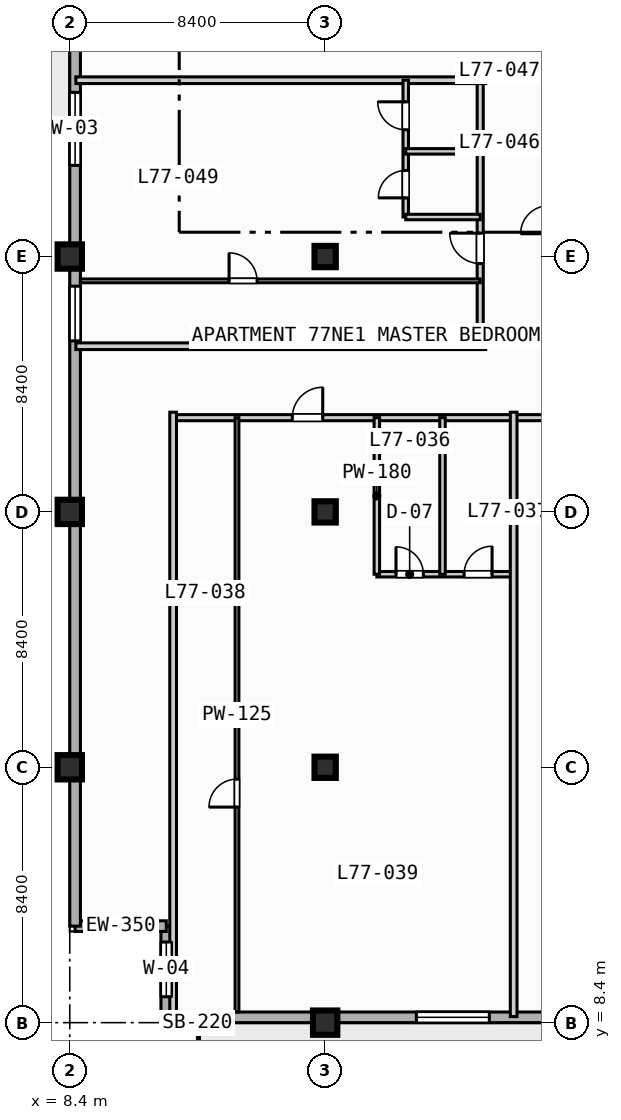
"""IFC4 building model, lengths in metres.
Left out: names, types, materials, properties, quantities, classifications, styles, units other than length and angle.
Written with IfcOpenShell. Run it as: python <this file> out.ifc"""

import sys

from ifc_helpers import new_model, si_unit, direction, frame, frame_2d, origin, origin_2d, place, context, subcontext, project, spatial, rectangle, extrude, element, fill, save


model = new_model("IFC4")
c1 = context("Model", 3, precision=1e-05, world=origin(), true_north=direction((0.0, 1.0)))
c2 = subcontext(c1, "Body", "Model", "MODEL_VIEW")
j1 = project(units=[si_unit("LENGTHUNIT", "METRE"), si_unit("PLANEANGLEUNIT", "RADIAN")], contexts=[c1])
p1 = place(None, origin())
s1 = spatial("IfcSite", under=j1, at=p1, CompositionType="ELEMENT")
p2 = place(p1, origin())
s2 = spatial("IfcBuilding", under=s1, at=p2, CompositionType="ELEMENT")
p3 = place(p2, frame((0.0, 0.0, 312.5)))
s3 = spatial("IfcBuildingStorey", under=s2, at=p3, CompositionType="ELEMENT", Elevation=312.5)
for number, where, z_axis, x_axis in (
    (1, (8.4, 16.8, 0.0), (0.0, 0.0, 1.0), (1.0, 0.0, 0.0)),
    (2, (8.4, 25.2, 0.0), (0.0, 0.0, 1.0), (1.0, 0.0, 0.0)),
    (3, (8.4, 33.6, 0.0), (0.0, 0.0, 1.0), (1.0, 0.0, 0.0)),
    (4, (16.8, 8.4, 0.0), (0.0, 0.0, 1.0), (1.0, 0.0, 0.0)),
):
    element("IfcColumn", number, at=place(p3, frame(where, z_axis=z_axis, x_axis=x_axis)), inside=s3, PredefinedType="COLUMN", context=c2, shape_type="SweptSolid", body=[
        extrude(rectangle(XDim=0.8, YDim=0.8, at=origin_2d()), origin(), (0.0, 0.0, 1.0), 3.9),
    ])
for number, where, z_axis, x_axis in (
    (5, (16.8, 16.8, 0.0), (0.0, 0.0, 1.0), (1.0, 0.0, 0.0)),
    (6, (16.8, 25.2, 0.0), (0.0, 0.0, 1.0), (1.0, 0.0, 0.0)),
    (7, (16.8, 33.6, 0.0), (0.0, 0.0, 1.0), (1.0, 0.0, 0.0)),
):
    element("IfcColumn", number, at=place(p3, frame(where, z_axis=z_axis, x_axis=x_axis)), inside=s3, PredefinedType="COLUMN", context=c2, shape_type="SweptSolid", body=[
        extrude(rectangle(XDim=0.7, YDim=0.7, at=origin_2d()), origin(), (0.0, 0.0, 1.0), 3.9),
    ])
p4 = place(p3, frame((11.575, 8.575, 0.0), z_axis=(0.0, 0.0, 1.0), x_axis=(0.0, 1.0, 0.0)))
e8 = element("IfcWall", 8, at=p4, inside=s3, PredefinedType="STANDARD", context=c2, shape_type="SweptSolid", body=[
    extrude(rectangle(XDim=3.0, YDim=0.35, at=frame_2d((1.5, 0.0))), origin(), (0.0, 0.0, 1.0), 3.67),
])
p5 = place(p4, frame((0.677, 0.0, 0.85)))
e9 = element("IfcOpeningElement", 9, at=p5, cuts=e8, PredefinedType="OPENING", context=c2, shape_type="SweptSolid", body=[
    extrude(rectangle(XDim=1.8, YDim=1.8, at=frame_2d((0.9, 0.9))), frame((0.0, 0.185, 0.0), z_axis=(0.0, -1.0, 0.0), x_axis=(1.0, 0.0, 0.0)), (0.0, 0.0, 1.0), 0.37),
])
p6 = place(p3, frame((11.575, 11.575, 0.0), z_axis=(0.0, 0.0, 1.0), x_axis=(-1.0, 0.0, 0.0)))
e10 = element("IfcWall", 10, at=p6, inside=s3, PredefinedType="STANDARD", context=c2, shape_type="SweptSolid", body=[
    extrude(rectangle(XDim=3.0, YDim=0.35, at=frame_2d((1.5, 0.0))), origin(), (0.0, 0.0, 1.0), 3.67),
])
p7 = place(p3, frame((8.575, 11.575, 0.0), z_axis=(0.0, 0.0, 1.0), x_axis=(0.0, 1.0, 0.0)))
e11 = element("IfcWall", 11, at=p7, inside=s3, PredefinedType="STANDARD", context=c2, shape_type="SweptSolid", body=[
    extrude(rectangle(XDim=60.85, YDim=0.35, at=frame_2d((30.425, 0.0))), origin(), (0.0, 0.0, 1.0), 3.67),
])
p8 = place(p7, frame((33.925, 0.0, 0.0)))
e12 = element("IfcOpeningElement", 12, at=p8, cuts=e11, PredefinedType="OPENING", context=c2, shape_type="SweptSolid", body=[
    extrude(rectangle(XDim=1.4, YDim=2.2, at=frame_2d((0.7, 1.1))), frame((0.0, 0.185, 0.0), z_axis=(0.0, -1.0, 0.0), x_axis=(1.0, 0.0, 0.0)), (0.0, 0.0, 1.0), 0.37),
])
p9 = place(p7, frame((25.025, 0.0, 0.85)))
e13 = element("IfcOpeningElement", 13, at=p9, cuts=e11, PredefinedType="OPENING", context=c2, shape_type="SweptSolid", body=[
    extrude(rectangle(XDim=2.4, YDim=1.95, at=frame_2d((1.2, 0.975))), frame((0.0, 0.185, 0.0), z_axis=(0.0, -1.0, 0.0), x_axis=(1.0, 0.0, 0.0)), (0.0, 0.0, 1.0), 0.37),
])
p10 = place(p7, frame((41.825, 0.0, 0.85)))
e14 = element("IfcOpeningElement", 14, at=p10, cuts=e11, PredefinedType="OPENING", context=c2, shape_type="SweptSolid", body=[
    extrude(rectangle(XDim=2.4, YDim=1.95, at=frame_2d((1.2, 0.975))), frame((0.0, 0.185, 0.0), z_axis=(0.0, -1.0, 0.0), x_axis=(1.0, 0.0, 0.0)), (0.0, 0.0, 1.0), 0.37),
])
p11 = place(p7, frame((19.25, 0.0, 0.85)))
e15 = element("IfcOpeningElement", 15, at=p11, cuts=e11, PredefinedType="OPENING", context=c2, shape_type="SweptSolid", body=[
    extrude(rectangle(XDim=1.8, YDim=1.8, at=frame_2d((0.9, 0.9))), frame((0.0, 0.185, 0.0), z_axis=(0.0, -1.0, 0.0), x_axis=(1.0, 0.0, 0.0)), (0.0, 0.0, 1.0), 0.37),
])
p12 = place(p3, frame((64.025, 8.575, 0.0), z_axis=(0.0, 0.0, 1.0), x_axis=(-1.0, 0.0, 0.0)))
e16 = element("IfcWall", 16, at=p12, inside=s3, PredefinedType="STANDARD", context=c2, shape_type="SweptSolid", body=[
    extrude(rectangle(XDim=52.45, YDim=0.35, at=frame_2d((26.225, 0.0))), origin(), (0.0, 0.0, 1.0), 3.67),
])
p13 = place(p12, frame((33.925, 0.0, 0.0)))
e17 = element("IfcOpeningElement", 17, at=p13, cuts=e16, PredefinedType="OPENING", context=c2, shape_type="SweptSolid", body=[
    extrude(rectangle(XDim=1.4, YDim=2.2, at=frame_2d((0.7, 1.1))), frame((0.0, 0.185, 0.0), z_axis=(0.0, -1.0, 0.0), x_axis=(1.0, 0.0, 0.0)), (0.0, 0.0, 1.0), 0.37),
])
p14 = place(p12, frame((41.825, 0.0, 0.85)))
e18 = element("IfcOpeningElement", 18, at=p14, cuts=e16, PredefinedType="OPENING", context=c2, shape_type="SweptSolid", body=[
    extrude(rectangle(XDim=2.4, YDim=1.95, at=frame_2d((1.2, 0.975))), frame((0.0, 0.185, 0.0), z_axis=(0.0, -1.0, 0.0), x_axis=(1.0, 0.0, 0.0)), (0.0, 0.0, 1.0), 0.37),
])
p15 = place(p12, frame((25.025, 0.0, 0.85)))
e19 = element("IfcOpeningElement", 19, at=p15, cuts=e16, PredefinedType="OPENING", context=c2, shape_type="SweptSolid", body=[
    extrude(rectangle(XDim=2.4, YDim=1.95, at=frame_2d((1.2, 0.975))), frame((0.0, 0.185, 0.0), z_axis=(0.0, -1.0, 0.0), x_axis=(1.0, 0.0, 0.0)), (0.0, 0.0, 1.0), 0.37),
])
p16 = place(p12, frame((16.925, 0.0, 0.85)))
e20 = element("IfcOpeningElement", 20, at=p16, cuts=e16, PredefinedType="OPENING", context=c2, shape_type="SweptSolid", body=[
    extrude(rectangle(XDim=1.8, YDim=1.8, at=frame_2d((0.9, 0.9))), frame((0.0, 0.185, 0.0), z_axis=(0.0, -1.0, 0.0), x_axis=(1.0, 0.0, 0.0)), (0.0, 0.0, 1.0), 0.37),
])
p17 = place(p12, frame((50.275, 0.0, 0.85)))
e21 = element("IfcOpeningElement", 21, at=p17, cuts=e16, PredefinedType="OPENING", context=c2, shape_type="SweptSolid", body=[
    extrude(rectangle(XDim=1.8, YDim=1.8, at=frame_2d((0.9, 0.9))), frame((0.0, 0.185, 0.0), z_axis=(0.0, -1.0, 0.0), x_axis=(1.0, 0.0, 0.0)), (0.0, 0.0, 1.0), 0.37),
])
p18 = place(p3, frame((11.8, 28.3, 0.0), z_axis=(0.0, 0.0, 1.0), x_axis=(1.0, 0.0, 0.0)))
e22 = element("IfcWall", 22, at=p18, inside=s3, PredefinedType="PARTITIONING", context=c2, shape_type="SweptSolid", body=[
    extrude(rectangle(XDim=27.6, YDim=0.2, at=frame_2d((13.8, 0.0))), origin(), (0.0, 0.0, 1.0), 3.67),
])
p19 = place(p18, frame((3.92, 0.0, 0.0)))
e23 = element("IfcOpeningElement", 23, at=p19, cuts=e22, PredefinedType="OPENING", context=c2, shape_type="SweptSolid", body=[
    extrude(rectangle(XDim=1.0, YDim=2.15, at=frame_2d((0.5, 1.075))), frame((0.0, 0.11, 0.0), z_axis=(0.0, -1.0, 0.0), x_axis=(1.0, 0.0, 0.0)), (0.0, 0.0, 1.0), 0.22),
])
p20 = place(p18, frame((12.57, 0.0, 0.0)))
e24 = element("IfcOpeningElement", 24, at=p20, cuts=e22, PredefinedType="OPENING", context=c2, shape_type="SweptSolid", body=[
    extrude(rectangle(XDim=1.0, YDim=2.15, at=frame_2d((0.5, 1.075))), frame((0.0, 0.11, 0.0), z_axis=(0.0, -1.0, 0.0), x_axis=(1.0, 0.0, 0.0)), (0.0, 0.0, 1.0), 0.22),
])
p21 = place(p18, frame((20.77, 0.0, 0.0)))
e25 = element("IfcOpeningElement", 25, at=p21, cuts=e22, PredefinedType="OPENING", context=c2, shape_type="SweptSolid", body=[
    extrude(rectangle(XDim=1.0, YDim=2.15, at=frame_2d((0.5, 1.075))), frame((0.0, 0.11, 0.0), z_axis=(0.0, -1.0, 0.0), x_axis=(1.0, 0.0, 0.0)), (0.0, 0.0, 1.0), 0.22),
])
p22 = place(p3, frame((11.8, 8.6, 0.0), z_axis=(0.0, 0.0, 1.0), x_axis=(0.0, 1.0, 0.0)))
e26 = element("IfcWall", 26, at=p22, inside=s3, PredefinedType="PARTITIONING", context=c2, shape_type="SweptSolid", body=[
    extrude(rectangle(XDim=19.88, YDim=0.22, at=frame_2d((9.94, 0.0))), origin(), (0.0, 0.0, 1.0), 3.67),
])
p23 = place(p3, frame((18.5, 23.15, 0.0), z_axis=(0.0, 0.0, 1.0), x_axis=(1.0, 0.0, 0.0)))
e27 = element("IfcWall", 27, at=p23, inside=s3, PredefinedType="PLUMBINGWALL", context=c2, shape_type="SweptSolid", body=[
    extrude(rectangle(XDim=4.5, YDim=0.18, at=frame_2d((2.25, 0.0))), origin(), (0.0, 0.0, 1.0), 3.67),
])
p24 = place(p23, frame((0.63, 0.0, 0.0)))
e28 = element("IfcOpeningElement", 28, at=p24, cuts=e27, PredefinedType="OPENING", context=c2, shape_type="SweptSolid", body=[
    extrude(rectangle(XDim=0.9, YDim=2.1, at=frame_2d((0.45, 1.05))), frame((0.0, 0.1, 0.0), z_axis=(0.0, -1.0, 0.0), x_axis=(1.0, 0.0, 0.0)), (0.0, 0.0, 1.0), 0.2),
])
p25 = place(p23, frame((2.87, 0.0, 0.0)))
e29 = element("IfcOpeningElement", 29, at=p25, cuts=e27, PredefinedType="OPENING", context=c2, shape_type="SweptSolid", body=[
    extrude(rectangle(XDim=0.92, YDim=2.1, at=frame_2d((0.46, 1.05))), frame((0.0, 0.1, 0.0), z_axis=(0.0, -1.0, 0.0), x_axis=(1.0, 0.0, 0.0)), (0.0, 0.0, 1.0), 0.2),
])
for number, where, z_axis, x_axis in (
    (30, (18.5, 23.15, 0.0), (0.0, 0.0, 1.0), (0.0, 1.0, 0.0)),
    (31, (20.66, 23.15, 0.0), (0.0, 0.0, 1.0), (0.0, 1.0, 0.0)),
):
    element("IfcWall", number, at=place(p3, frame(where, z_axis=z_axis, x_axis=x_axis)), inside=s3, PredefinedType="PLUMBINGWALL", context=c2, shape_type="SweptSolid", body=[
        extrude(rectangle(XDim=5.15, YDim=0.18, at=frame_2d((2.575, 0.0))), origin(), (0.0, 0.0, 1.0), 3.67),
    ])
p26 = place(p3, frame((13.9, 8.75, 0.0), z_axis=(0.0, 0.0, 1.0), x_axis=(0.0, 1.0, 0.0)))
e32 = element("IfcWall", 32, at=p26, inside=s3, PredefinedType="PARTITIONING", context=c2, shape_type="SweptSolid", body=[
    extrude(rectangle(XDim=19.55, YDim=0.125, at=frame_2d((9.775, 0.0))), origin(), (0.0, 0.0, 1.0), 3.67),
])
p27 = place(p26, frame((6.74, 0.0, 0.0)))
e33 = element("IfcOpeningElement", 33, at=p27, cuts=e32, PredefinedType="OPENING", context=c2, shape_type="SweptSolid", body=[
    extrude(rectangle(XDim=0.92, YDim=2.1, at=frame_2d((0.46, 1.05))), frame((0.0, 0.073, 0.0), z_axis=(0.0, -1.0, 0.0), x_axis=(1.0, 0.0, 0.0)), (0.0, 0.0, 1.0), 0.145),
])
p28 = place(p3, frame((23.0, 8.6, 0.0), z_axis=(0.0, 0.0, 1.0), x_axis=(0.0, 1.0, 0.0)))
e34 = element("IfcWall", 34, at=p28, inside=s3, PredefinedType="PARTITIONING", context=c2, shape_type="SweptSolid", body=[
    extrude(rectangle(XDim=19.88, YDim=0.22, at=frame_2d((9.94, 0.0))), origin(), (0.0, 0.0, 1.0), 3.67),
])
p29 = place(p3, frame((21.9, 30.65, 0.0), z_axis=(0.0, 0.0, 1.0), x_axis=(0.0, 1.0, 0.0)))
e35 = element("IfcWall", 35, at=p29, inside=s3, PredefinedType="PARTITIONING", context=c2, shape_type="SweptSolid", body=[
    extrude(rectangle(XDim=8.75, YDim=0.2, at=frame_2d((4.375, 0.0))), origin(), (0.0, 0.0, 1.0), 3.67),
])
p30 = place(p29, frame((2.72, 0.0, 0.0)))
e36 = element("IfcOpeningElement", 36, at=p30, cuts=e35, PredefinedType="OPENING", context=c2, shape_type="SweptSolid", body=[
    extrude(rectangle(XDim=1.0, YDim=2.15, at=frame_2d((0.5, 1.075))), frame((0.0, 0.11, 0.0), z_axis=(0.0, -1.0, 0.0), x_axis=(1.0, 0.0, 0.0)), (0.0, 0.0, 1.0), 0.22),
])
for number, where, z_axis, x_axis in (
    (37, (8.6, 30.65, 0.0), (0.0, 0.0, 1.0), (1.0, 0.0, 0.0)),
    (38, (8.6, 39.4, 0.0), (0.0, 0.0, 1.0), (1.0, 0.0, 0.0)),
):
    element("IfcWall", number, at=place(p3, frame(where, z_axis=z_axis, x_axis=x_axis)), inside=s3, PredefinedType="PARTITIONING", context=c2, shape_type="SweptSolid", body=[
        extrude(rectangle(XDim=13.48, YDim=0.22, at=frame_2d((6.74, 0.0))), origin(), (0.0, 0.0, 1.0), 3.67),
    ])
p31 = place(p3, frame((19.45, 34.9, 0.0), z_axis=(0.0, 0.0, 1.0), x_axis=(0.0, 1.0, 0.0)))
e39 = element("IfcWall", 39, at=p31, inside=s3, PredefinedType="PLUMBINGWALL", context=c2, shape_type="SweptSolid", body=[
    extrude(rectangle(XDim=4.5, YDim=0.18, at=frame_2d((2.25, 0.0))), origin(), (0.0, 0.0, 1.0), 3.67),
])
p32 = place(p31, frame((0.63, 0.0, 0.0)))
e40 = element("IfcOpeningElement", 40, at=p32, cuts=e39, PredefinedType="OPENING", context=c2, shape_type="SweptSolid", body=[
    extrude(rectangle(XDim=0.9, YDim=2.1, at=frame_2d((0.45, 1.05))), frame((0.0, 0.1, 0.0), z_axis=(0.0, -1.0, 0.0), x_axis=(1.0, 0.0, 0.0)), (0.0, 0.0, 1.0), 0.2),
])
p33 = place(p31, frame((2.87, 0.0, 0.0)))
e41 = element("IfcOpeningElement", 41, at=p33, cuts=e39, PredefinedType="OPENING", context=c2, shape_type="SweptSolid", body=[
    extrude(rectangle(XDim=0.92, YDim=2.1, at=frame_2d((0.46, 1.05))), frame((0.0, 0.1, 0.0), z_axis=(0.0, -1.0, 0.0), x_axis=(1.0, 0.0, 0.0)), (0.0, 0.0, 1.0), 0.2),
])
for number, where, z_axis, x_axis in (
    (42, (19.45, 34.9, 0.0), (0.0, 0.0, 1.0), (1.0, 0.0, 0.0)),
    (43, (19.45, 37.06, 0.0), (0.0, 0.0, 1.0), (1.0, 0.0, 0.0)),
):
    element("IfcWall", number, at=place(p3, frame(where, z_axis=z_axis, x_axis=x_axis)), inside=s3, PredefinedType="PLUMBINGWALL", context=c2, shape_type="SweptSolid", body=[
        extrude(rectangle(XDim=2.45, YDim=0.18, at=frame_2d((1.225, 0.0))), origin(), (0.0, 0.0, 1.0), 3.67),
    ])
p34 = place(p3, frame((8.75, 32.8, 0.0), z_axis=(0.0, 0.0, 1.0), x_axis=(1.0, 0.0, 0.0)))
e44 = element("IfcWall", 44, at=p34, inside=s3, PredefinedType="PARTITIONING", context=c2, shape_type="SweptSolid", body=[
    extrude(rectangle(XDim=13.15, YDim=0.125, at=frame_2d((6.575, 0.0))), origin(), (0.0, 0.0, 1.0), 3.67),
])
p35 = place(p34, frame((4.89, 0.0, 0.0)))
e45 = element("IfcOpeningElement", 45, at=p35, cuts=e44, PredefinedType="OPENING", context=c2, shape_type="SweptSolid", body=[
    extrude(rectangle(XDim=0.92, YDim=2.1, at=frame_2d((0.46, 1.05))), frame((0.0, 0.073, 0.0), z_axis=(0.0, -1.0, 0.0), x_axis=(1.0, 0.0, 0.0)), (0.0, 0.0, 1.0), 0.145),
])
p36 = place(p5, origin())
e46 = element("IfcWindow", 46, at=p36, inside=s3, PartitioningType="SINGLE_PANEL", PredefinedType="WINDOW", context=c2, shape_type="SweptSolid", body=[
    extrude(rectangle(XDim=1.8, YDim=1.8, at=frame_2d((0.9, 0.9))), frame((0.0, 0.03, 0.0), z_axis=(0.0, -1.0, 0.0), x_axis=(1.0, 0.0, 0.0)), (0.0, 0.0, 1.0), 0.06),
])
fill(e9, e46)
p37 = place(p9, origin())
e47 = element("IfcWindow", 47, at=p37, inside=s3, PartitioningType="SINGLE_PANEL", PredefinedType="WINDOW", context=c2, shape_type="SweptSolid", body=[
    extrude(rectangle(XDim=2.4, YDim=1.95, at=frame_2d((1.2, 0.975))), frame((0.0, 0.03, 0.0), z_axis=(0.0, -1.0, 0.0), x_axis=(1.0, 0.0, 0.0)), (0.0, 0.0, 1.0), 0.06),
])
fill(e13, e47)
p38 = place(p11, origin())
e48 = element("IfcWindow", 48, at=p38, inside=s3, PartitioningType="SINGLE_PANEL", PredefinedType="WINDOW", context=c2, shape_type="SweptSolid", body=[
    extrude(rectangle(XDim=1.8, YDim=1.8, at=frame_2d((0.9, 0.9))), frame((0.0, 0.03, 0.0), z_axis=(0.0, -1.0, 0.0), x_axis=(1.0, 0.0, 0.0)), (0.0, 0.0, 1.0), 0.06),
])
fill(e15, e48)
p39 = place(p14, origin())
e49 = element("IfcWindow", 49, at=p39, inside=s3, PartitioningType="SINGLE_PANEL", PredefinedType="WINDOW", context=c2, shape_type="SweptSolid", body=[
    extrude(rectangle(XDim=2.4, YDim=1.95, at=frame_2d((1.2, 0.975))), frame((0.0, 0.03, 0.0), z_axis=(0.0, -1.0, 0.0), x_axis=(1.0, 0.0, 0.0)), (0.0, 0.0, 1.0), 0.06),
])
fill(e18, e49)
p40 = place(p17, origin())
e50 = element("IfcWindow", 50, at=p40, inside=s3, PartitioningType="SINGLE_PANEL", PredefinedType="WINDOW", context=c2, shape_type="SweptSolid", body=[
    extrude(rectangle(XDim=1.8, YDim=1.8, at=frame_2d((0.9, 0.9))), frame((0.0, 0.03, 0.0), z_axis=(0.0, -1.0, 0.0), x_axis=(1.0, 0.0, 0.0)), (0.0, 0.0, 1.0), 0.06),
])
fill(e21, e50)
p41 = place(p19, origin())
e51 = element("IfcDoor", 51, at=p41, inside=s3, OperationType="SINGLE_SWING_RIGHT", PredefinedType="DOOR", context=c2, shape_type="SweptSolid", body=[
    extrude(rectangle(XDim=1.0, YDim=2.15, at=frame_2d((0.5, 1.075))), frame((0.0, 0.025, 0.0), z_axis=(0.0, -1.0, 0.0), x_axis=(1.0, 0.0, 0.0)), (0.0, 0.0, 1.0), 0.05),
])
fill(e23, e51)
p42 = place(p24, origin())
e52 = element("IfcDoor", 52, at=p42, inside=s3, OperationType="SINGLE_SWING_LEFT", PredefinedType="DOOR", context=c2, shape_type="SweptSolid", body=[
    extrude(rectangle(XDim=0.9, YDim=2.1, at=frame_2d((0.45, 1.05))), frame((0.0, 0.025, 0.0), z_axis=(0.0, -1.0, 0.0), x_axis=(1.0, 0.0, 0.0)), (0.0, 0.0, 1.0), 0.05),
])
fill(e28, e52)
p43 = place(p25, origin())
e53 = element("IfcDoor", 53, at=p43, inside=s3, OperationType="SINGLE_SWING_RIGHT", PredefinedType="DOOR", context=c2, shape_type="SweptSolid", body=[
    extrude(rectangle(XDim=0.92, YDim=2.1, at=frame_2d((0.46, 1.05))), frame((0.0, 0.025, 0.0), z_axis=(0.0, -1.0, 0.0), x_axis=(1.0, 0.0, 0.0)), (0.0, 0.0, 1.0), 0.05),
])
fill(e29, e53)
p44 = place(p27, origin())
e54 = element("IfcDoor", 54, at=p44, inside=s3, OperationType="SINGLE_SWING_LEFT", PredefinedType="DOOR", context=c2, shape_type="SweptSolid", body=[
    extrude(rectangle(XDim=0.92, YDim=2.1, at=frame_2d((0.46, 1.05))), frame((0.0, 0.025, 0.0), z_axis=(0.0, -1.0, 0.0), x_axis=(1.0, 0.0, 0.0)), (0.0, 0.0, 1.0), 0.05),
])
fill(e33, e54)
p45 = place(p30, origin())
e55 = element("IfcDoor", 55, at=p45, inside=s3, OperationType="SINGLE_SWING_RIGHT", PredefinedType="DOOR", context=c2, shape_type="SweptSolid", body=[
    extrude(rectangle(XDim=1.0, YDim=2.15, at=frame_2d((0.5, 1.075))), frame((0.0, 0.025, 0.0), z_axis=(0.0, -1.0, 0.0), x_axis=(1.0, 0.0, 0.0)), (0.0, 0.0, 1.0), 0.05),
])
fill(e36, e55)
p46 = place(p32, origin())
e56 = element("IfcDoor", 56, at=p46, inside=s3, OperationType="SINGLE_SWING_LEFT", PredefinedType="DOOR", context=c2, shape_type="SweptSolid", body=[
    extrude(rectangle(XDim=0.9, YDim=2.1, at=frame_2d((0.45, 1.05))), frame((0.0, 0.025, 0.0), z_axis=(0.0, -1.0, 0.0), x_axis=(1.0, 0.0, 0.0)), (0.0, 0.0, 1.0), 0.05),
])
fill(e40, e56)
p47 = place(p33, origin())
e57 = element("IfcDoor", 57, at=p47, inside=s3, OperationType="SINGLE_SWING_RIGHT", PredefinedType="DOOR", context=c2, shape_type="SweptSolid", body=[
    extrude(rectangle(XDim=0.92, YDim=2.1, at=frame_2d((0.46, 1.05))), frame((0.0, 0.025, 0.0), z_axis=(0.0, -1.0, 0.0), x_axis=(1.0, 0.0, 0.0)), (0.0, 0.0, 1.0), 0.05),
])
fill(e41, e57)
p48 = place(p35, origin())
e58 = element("IfcDoor", 58, at=p48, inside=s3, OperationType="SINGLE_SWING_LEFT", PredefinedType="DOOR", context=c2, shape_type="SweptSolid", body=[
    extrude(rectangle(XDim=0.92, YDim=2.1, at=frame_2d((0.46, 1.05))), frame((0.0, 0.025, 0.0), z_axis=(0.0, -1.0, 0.0), x_axis=(1.0, 0.0, 0.0)), (0.0, 0.0, 1.0), 0.05),
])
fill(e45, e58)
save(model, sys.argv[1])
